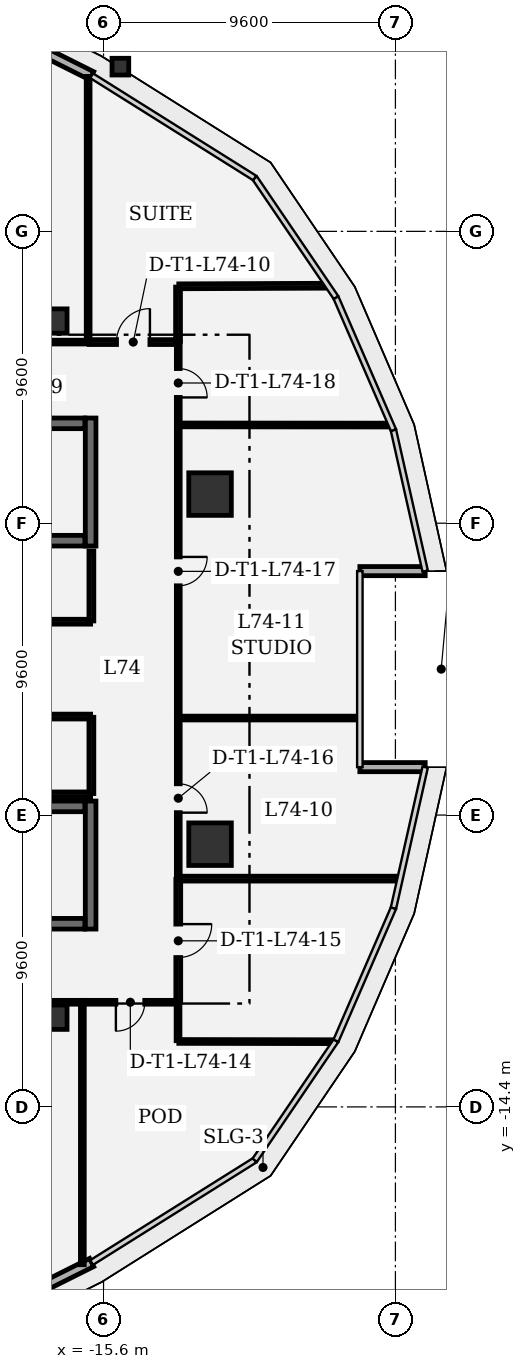
"""IFC4 building model, lengths in metres.
Left out: names, types, materials, properties, quantities, classifications, styles, units other than length and angle.
Written with IfcOpenShell. Run it as: python <this file> out.ifc"""

import sys

from ifc_helpers import new_model, si_unit, direction, frame, frame_2d, origin, origin_2d, place, context, subcontext, project, spatial, rectangle, extrude, element, fill, save


model = new_model("IFC4")
c1 = context("Model", 3, precision=1e-05, world=origin(), true_north=direction((0.0, 1.0)))
c2 = subcontext(c1, "Body", "Model", "MODEL_VIEW")
j1 = project(units=[si_unit("LENGTHUNIT", "METRE"), si_unit("PLANEANGLEUNIT", "RADIAN")], contexts=[c1])
p1 = place(None, origin())
s1 = spatial("IfcSite", under=j1, at=p1, CompositionType="ELEMENT")
p2 = place(p1, origin())
s2 = spatial("IfcBuilding", under=s1, at=p2, CompositionType="ELEMENT")
p3 = place(p2, frame((0.0, 0.0, 318.6)))
s3 = spatial("IfcBuildingStorey", under=s2, at=p3, CompositionType="ELEMENT", Elevation=318.6)
for number, where, z_axis, x_axis in (
    (1, (-12.097, -5.758, 0.0), (0.0, 0.0, 1.0), (1.0, 0.0, 0.0)),
    (2, (-12.097, 5.758, 0.0), (0.0, 0.0, 1.0), (1.0, 0.0, 0.0)),
):
    element("IfcColumn", number, at=place(p3, frame(where, z_axis=z_axis, x_axis=x_axis)), inside=s3, PredefinedType="COLUMN", context=c2, shape_type="SweptSolid", body=[
        extrude(rectangle(XDim=1.4, YDim=1.4, at=origin_2d()), origin(), (0.0, 0.0, 1.0), 4.2),
    ])
for number, where, z_axis, x_axis in (
    (3, (-17.2, 11.45, 0.0), (0.0, 0.0, 1.0), (1.0, 0.0, 0.0)),
    (4, (-17.2, -11.45, 0.0), (0.0, 0.0, 1.0), (1.0, 0.0, 0.0)),
):
    element("IfcColumn", number, at=place(p3, frame(where, z_axis=z_axis, x_axis=x_axis)), inside=s3, PredefinedType="COLUMN", context=c2, shape_type="SweptSolid", body=[
        extrude(rectangle(XDim=0.8, YDim=0.8, at=origin_2d()), origin(), (0.0, 0.0, 1.0), 4.2),
    ])
p4 = place(p3, frame((-15.046, 19.818, 0.0), z_axis=(0.0, 0.0, 1.0), x_axis=(1.0, 0.0, 0.0)))
e5 = element("IfcColumn", 5, at=p4, inside=s3, PredefinedType="COLUMN", context=c2, shape_type="SweptSolid", body=[
    extrude(rectangle(XDim=0.55, YDim=0.55, at=origin_2d()), origin(), (0.0, 0.0, 1.0), 4.2),
])
p5 = place(p3, frame((-15.991, -19.518, 0.0), z_axis=(0.0, 0.0, 1.0), x_axis=(-0.894441735477, -0.447184505362, 0.0)))
e6 = element("IfcWall", 6, at=p5, inside=s3, PredefinedType="SOLIDWALL", context=c2, shape_type="SweptSolid", body=[
    extrude(rectangle(XDim=3.357, YDim=0.3, at=frame_2d((1.678, 0.0))), origin(), (0.0, 0.0, 1.0), 3.91),
])
for number, where, z_axis, x_axis in (
    (7, (-5.021, -3.224, 0.0), (0.0, 0.0, 1.0), (-1.0, 0.0, 0.0)),
    (8, (-7.17, 3.224, 0.0), (0.0, 0.0, 1.0), (1.0, 0.0, 0.0)),
):
    element("IfcWall", number, at=place(p3, frame(where, z_axis=z_axis, x_axis=x_axis)), inside=s3, PredefinedType="SOLIDWALL", context=c2, shape_type="SweptSolid", body=[
        extrude(rectangle(XDim=2.149, YDim=0.3, at=frame_2d((1.075, 0.0))), origin(), (0.0, 0.0, 1.0), 3.91),
    ])
p6 = place(p3, frame((-18.993, 21.019, 0.0), z_axis=(0.0, 0.0, 1.0), x_axis=(0.894441735477, -0.447184505362, 0.0)))
e9 = element("IfcWall", 9, at=p6, inside=s3, PredefinedType="SOLIDWALL", context=c2, shape_type="SweptSolid", body=[
    extrude(rectangle(XDim=3.357, YDim=0.3, at=frame_2d((1.678, 0.0))), origin(), (0.0, 0.0, 1.0), 3.91),
])
p7 = place(p3, frame((-16.025, 4.05, 0.0), z_axis=(0.0, 0.0, 1.0), x_axis=(0.0, 1.0, 0.0)))
e10 = element("IfcWall", 10, at=p7, inside=s3, PredefinedType="SHEAR", context=c2, shape_type="SweptSolid", body=[
    extrude(rectangle(XDim=4.21, YDim=0.35, at=frame_2d((2.105, 0.0))), origin(), (0.0, 0.0, 1.0), 3.91),
])
p8 = place(p3, frame((-24.335, 4.225, 0.0), z_axis=(0.0, 0.0, 1.0), x_axis=(1.0, 0.0, 0.0)))
e11 = element("IfcWall", 11, at=p8, inside=s3, PredefinedType="SHEAR", context=c2, shape_type="SweptSolid", body=[
    extrude(rectangle(XDim=8.12, YDim=0.35, at=frame_2d((4.06, 0.0))), origin(), (0.0, 0.0, 1.0), 3.91),
])
p9 = place(p3, frame((-16.215, 8.085, 0.0), z_axis=(0.0, 0.0, 1.0), x_axis=(-1.0, 0.0, 0.0)))
e12 = element("IfcWall", 12, at=p9, inside=s3, PredefinedType="SHEAR", context=c2, shape_type="SweptSolid", body=[
    extrude(rectangle(XDim=8.12, YDim=0.35, at=frame_2d((4.06, 0.0))), origin(), (0.0, 0.0, 1.0), 3.91),
])
p10 = place(p9, frame((6.74, 0.0, 0.0)))
e13 = element("IfcOpeningElement", 13, at=p10, cuts=e12, PredefinedType="OPENING", context=c2, shape_type="SweptSolid", body=[
    extrude(rectangle(XDim=1.1, YDim=2.2, at=frame_2d((0.55, 1.1))), frame((0.0, 0.185, 0.0), z_axis=(0.0, -1.0, 0.0), x_axis=(1.0, 0.0, 0.0)), (0.0, 0.0, 1.0), 0.37),
])
p11 = place(p3, frame((-16.025, -8.55, 0.0), z_axis=(0.0, 0.0, 1.0), x_axis=(0.0, 1.0, 0.0)))
e14 = element("IfcWall", 14, at=p11, inside=s3, PredefinedType="SHEAR", context=c2, shape_type="SweptSolid", body=[
    extrude(rectangle(XDim=4.21, YDim=0.35, at=frame_2d((2.105, 0.0))), origin(), (0.0, 0.0, 1.0), 3.91),
])
p12 = place(p3, frame((-24.335, -8.375, 0.0), z_axis=(0.0, 0.0, 1.0), x_axis=(1.0, 0.0, 0.0)))
e15 = element("IfcWall", 15, at=p12, inside=s3, PredefinedType="SHEAR", context=c2, shape_type="SweptSolid", body=[
    extrude(rectangle(XDim=8.12, YDim=0.35, at=frame_2d((4.06, 0.0))), origin(), (0.0, 0.0, 1.0), 3.91),
])
p13 = place(p12, frame((0.28, 0.0, 0.0)))
e16 = element("IfcOpeningElement", 16, at=p13, cuts=e15, PredefinedType="OPENING", context=c2, shape_type="SweptSolid", body=[
    extrude(rectangle(XDim=1.1, YDim=2.2, at=frame_2d((0.55, 1.1))), frame((0.0, 0.185, 0.0), z_axis=(0.0, -1.0, 0.0), x_axis=(1.0, 0.0, 0.0)), (0.0, 0.0, 1.0), 0.37),
])
p14 = place(p3, frame((-16.215, -4.515, 0.0), z_axis=(0.0, 0.0, 1.0), x_axis=(-1.0, 0.0, 0.0)))
e17 = element("IfcWall", 17, at=p14, inside=s3, PredefinedType="SHEAR", context=c2, shape_type="SweptSolid", body=[
    extrude(rectangle(XDim=8.12, YDim=0.35, at=frame_2d((4.06, 0.0))), origin(), (0.0, 0.0, 1.0), 3.91),
])
p15 = place(p3, frame((-22.934, 1.56, 0.0), z_axis=(0.0, 0.0, 1.0), x_axis=(1.0, 0.0, 0.0)))
e18 = element("IfcWall", 18, at=p15, inside=s3, PredefinedType="PARTITIONING", context=c2, shape_type="SweptSolid", body=[
    extrude(rectangle(XDim=6.909, YDim=0.16, at=frame_2d((3.455, 0.0))), origin(), (0.0, 0.0, 1.0), 3.91),
])
p16 = place(p15, frame((2.905, 0.0, 0.0)))
e19 = element("IfcOpeningElement", 19, at=p16, cuts=e18, PredefinedType="OPENING", context=c2, shape_type="SweptSolid", body=[
    extrude(rectangle(XDim=1.1, YDim=2.15, at=frame_2d((0.55, 1.075))), frame((0.0, 0.09, 0.0), z_axis=(0.0, -1.0, 0.0), x_axis=(1.0, 0.0, 0.0)), (0.0, 0.0, 1.0), 0.18),
])
p17 = place(p3, frame((-16.0, 1.585, 0.0), z_axis=(0.0, 0.0, 1.0), x_axis=(0.0, 1.0, 0.0)))
e20 = element("IfcWall", 20, at=p17, inside=s3, PredefinedType="PARTITIONING", context=c2, shape_type="SweptSolid", body=[
    extrude(rectangle(XDim=2.302, YDim=0.16, at=frame_2d((1.151, 0.0))), origin(), (0.0, 0.0, 1.0), 3.91),
])
p18 = place(p3, frame((-28.575, -4.12, 0.0), z_axis=(0.0, 0.0, 1.0), x_axis=(1.0, 0.0, 0.0)))
e21 = element("IfcWall", 21, at=p18, inside=s3, PredefinedType="PARTITIONING", context=c2, shape_type="SweptSolid", body=[
    extrude(rectangle(XDim=12.55, YDim=0.16, at=frame_2d((6.275, 0.0))), origin(), (0.0, 0.0, 1.0), 3.91),
])
p19 = place(p3, frame((-16.0, -4.095, 0.0), z_axis=(0.0, 0.0, 1.0), x_axis=(0.0, 1.0, 0.0)))
e22 = element("IfcWall", 22, at=p19, inside=s3, PredefinedType="PARTITIONING", context=c2, shape_type="SweptSolid", body=[
    extrude(rectangle(XDim=2.51, YDim=0.16, at=frame_2d((1.255, 0.0))), origin(), (0.0, 0.0, 1.0), 3.91),
])
p20 = place(p3, frame((-16.025, -1.56, 0.0), z_axis=(0.0, 0.0, 1.0), x_axis=(-1.0, 0.0, 0.0)))
e23 = element("IfcWall", 23, at=p20, inside=s3, PredefinedType="PARTITIONING", context=c2, shape_type="SweptSolid", body=[
    extrude(rectangle(XDim=8.709, YDim=0.16, at=frame_2d((4.354, 0.0))), origin(), (0.0, 0.0, 1.0), 3.91),
])
p21 = place(p20, frame((3.804, 0.0, 0.0)))
e24 = element("IfcOpeningElement", 24, at=p21, cuts=e23, PredefinedType="OPENING", context=c2, shape_type="SweptSolid", body=[
    extrude(rectangle(XDim=1.1, YDim=2.15, at=frame_2d((0.55, 1.075))), frame((0.0, 0.09, 0.0), z_axis=(0.0, -1.0, 0.0), x_axis=(1.0, 0.0, 0.0)), (0.0, 0.0, 1.0), 0.18),
])
p22 = place(p3, frame((-21.78, 10.758, 0.0), z_axis=(0.0, 0.0, 1.0), x_axis=(1.0, 0.0, 0.0)))
e25 = element("IfcWall", 25, at=p22, inside=s3, PredefinedType="PARTITIONING", context=c2, shape_type="SweptSolid", body=[
    extrude(rectangle(XDim=5.649, YDim=0.125, at=frame_2d((2.824, 0.0))), origin(), (0.0, 0.0, 1.0), 3.529),
])
p23 = place(p22, frame((2.349, 0.0, 0.0)))
e26 = element("IfcOpeningElement", 26, at=p23, cuts=e25, PredefinedType="OPENING", context=c2, shape_type="SweptSolid", body=[
    extrude(rectangle(XDim=0.95, YDim=2.15, at=frame_2d((0.475, 1.075))), frame((0.0, 0.073, 0.0), z_axis=(0.0, -1.0, 0.0), x_axis=(1.0, 0.0, 0.0)), (0.0, 0.0, 1.0), 0.145),
])
p24 = place(p3, frame((-16.106, 10.783, 0.0), z_axis=(0.0, 0.0, 1.0), x_axis=(-0.000112079351, 0.999999993719, 0.0)))
e27 = element("IfcWall", 27, at=p24, inside=s3, PredefinedType="PARTITIONING", context=c2, shape_type="SweptSolid", body=[
    extrude(rectangle(XDim=8.713, YDim=0.125, at=frame_2d((4.356, 0.0))), origin(), (0.0, 0.0, 1.0), 3.13),
])
p25 = place(p3, frame((-16.073, 10.758, 0.0), z_axis=(0.0, 0.0, 1.0), x_axis=(1.0, 0.0, 0.0)))
e28 = element("IfcWall", 28, at=p25, inside=s3, PredefinedType="PARTITIONING", context=c2, shape_type="SweptSolid", body=[
    extrude(rectangle(XDim=2.899, YDim=0.16, at=frame_2d((1.449, 0.0))), origin(), (0.0, 0.0, 1.0), 3.91),
])
p26 = place(p25, frame((0.899, 0.0, 0.0)))
e29 = element("IfcOpeningElement", 29, at=p26, cuts=e28, PredefinedType="OPENING", context=c2, shape_type="SweptSolid", body=[
    extrude(rectangle(XDim=1.1, YDim=2.15, at=frame_2d((0.55, 1.075))), frame((0.0, 0.09, 0.0), z_axis=(0.0, -1.0, 0.0), x_axis=(1.0, 0.0, 0.0)), (0.0, 0.0, 1.0), 0.18),
])
p27 = place(p3, frame((-13.15, 10.783, 0.0), z_axis=(0.0, 0.0, 1.0), x_axis=(0.0, 1.0, 0.0)))
e30 = element("IfcWall", 30, at=p27, inside=s3, PredefinedType="PARTITIONING", context=c2, shape_type="SweptSolid", body=[
    extrude(rectangle(XDim=1.784, YDim=0.16, at=frame_2d((0.892, 0.0))), origin(), (0.0, 0.0, 1.0), 3.91),
])
p28 = place(p3, frame((-13.125, 12.593, 0.0), z_axis=(0.0, 0.0, 1.0), x_axis=(0.999992212385, 0.003946538786, 0.0)))
e31 = element("IfcWall", 31, at=p28, inside=s3, PredefinedType="PARTITIONING", context=c2, shape_type="SweptSolid", body=[
    extrude(rectangle(XDim=4.825, YDim=0.16, at=frame_2d((2.413, 0.0))), origin(), (0.0, 0.0, 1.0), 3.91),
])
p29 = place(p3, frame((-16.322, -10.958, 0.0), z_axis=(0.0, 0.0, 1.0), x_axis=(-1.0, 0.0, 0.0)))
e32 = element("IfcWall", 32, at=p29, inside=s3, PredefinedType="PARTITIONING", context=c2, shape_type="SweptSolid", body=[
    extrude(rectangle(XDim=6.522, YDim=0.125, at=frame_2d((3.261, 0.0))), origin(), (0.0, 0.0, 1.0), 3.529),
])
p30 = place(p29, frame((2.786, 0.0, 0.0)))
e33 = element("IfcOpeningElement", 33, at=p30, cuts=e32, PredefinedType="OPENING", context=c2, shape_type="SweptSolid", body=[
    extrude(rectangle(XDim=0.95, YDim=2.15, at=frame_2d((0.475, 1.075))), frame((0.0, 0.073, 0.0), z_axis=(0.0, -1.0, 0.0), x_axis=(1.0, 0.0, 0.0)), (0.0, 0.0, 1.0), 0.145),
])
p31 = place(p3, frame((-16.297, -19.591, 0.0), z_axis=(0.0, 0.0, 1.0), x_axis=(8.5082246e-05, 0.999999996381, 0.0)))
e34 = element("IfcWall", 34, at=p31, inside=s3, PredefinedType="PARTITIONING", context=c2, shape_type="SweptSolid", body=[
    extrude(rectangle(XDim=8.608, YDim=0.125, at=frame_2d((4.304, 0.0))), origin(), (0.0, 0.0, 1.0), 3.13),
])
p32 = place(p3, frame((-8.057, -12.255, 0.0), z_axis=(0.0, 0.0, 1.0), x_axis=(-0.999998811776, 0.001541572501, 0.0)))
e35 = element("IfcWall", 35, at=p32, inside=s3, PredefinedType="PARTITIONING", context=c2, shape_type="SweptSolid", body=[
    extrude(rectangle(XDim=5.068, YDim=0.125, at=frame_2d((2.534, 0.0))), origin(), (0.0, 0.0, 1.0), 3.91),
])
p33 = place(p3, frame((-13.15, -12.222, 0.0), z_axis=(0.0, 0.0, 1.0), x_axis=(0.0, 1.0, 0.0)))
e36 = element("IfcWall", 36, at=p33, inside=s3, PredefinedType="PARTITIONING", context=c2, shape_type="SweptSolid", body=[
    extrude(rectangle(XDim=1.239, YDim=0.125, at=frame_2d((0.62, 0.0))), origin(), (0.0, 0.0, 1.0), 3.91),
])
p34 = place(p3, frame((-13.175, -10.958, 0.0), z_axis=(0.0, 0.0, 1.0), x_axis=(-1.0, 0.0, 0.0)))
e37 = element("IfcWall", 37, at=p34, inside=s3, PredefinedType="PARTITIONING", context=c2, shape_type="SweptSolid", body=[
    extrude(rectangle(XDim=3.089, YDim=0.125, at=frame_2d((1.544, 0.0))), origin(), (0.0, 0.0, 1.0), 3.91),
])
p35 = place(p34, frame((1.069, 0.0, 0.0)))
e38 = element("IfcOpeningElement", 38, at=p35, cuts=e37, PredefinedType="OPENING", context=c2, shape_type="SweptSolid", body=[
    extrude(rectangle(XDim=0.95, YDim=2.15, at=frame_2d((0.475, 1.075))), frame((0.0, 0.073, 0.0), z_axis=(0.0, -1.0, 0.0), x_axis=(1.0, 0.0, 0.0)), (0.0, 0.0, 1.0), 0.145),
])
p36 = place(p3, frame((-5.926, -6.891, 0.0), z_axis=(0.0, 0.0, 1.0), x_axis=(-1.0, 0.0, 0.0)))
e39 = element("IfcWall", 39, at=p36, inside=s3, PredefinedType="PARTITIONING", context=c2, shape_type="SweptSolid", body=[
    extrude(rectangle(XDim=7.191, YDim=0.16, at=frame_2d((3.596, 0.0))), origin(), (0.0, 0.0, 1.0), 3.91),
])
p37 = place(p3, frame((-13.142, -6.916, 0.0), z_axis=(0.0, 0.0, 1.0), x_axis=(0.0, -1.0, 0.0)))
e40 = element("IfcWall", 40, at=p37, inside=s3, PredefinedType="PARTITIONING", context=c2, shape_type="SweptSolid", body=[
    extrude(rectangle(XDim=4.042, YDim=0.16, at=frame_2d((2.021, 0.0))), origin(), (0.0, 0.0, 1.0), 3.13),
])
p38 = place(p37, frame((1.471, 0.0, 0.0)))
e41 = element("IfcOpeningElement", 41, at=p38, cuts=e40, PredefinedType="OPENING", context=c2, shape_type="SweptSolid", body=[
    extrude(rectangle(XDim=1.1, YDim=2.15, at=frame_2d((0.55, 1.075))), frame((0.0, 0.09, 0.0), z_axis=(0.0, -1.0, 0.0), x_axis=(1.0, 0.0, 0.0)), (0.0, 0.0, 1.0), 0.18),
])
p39 = place(p3, frame((-7.25, -1.609, 0.0), z_axis=(0.0, 0.0, 1.0), x_axis=(-1.0, 0.0, 0.0)))
e42 = element("IfcWall", 42, at=p39, inside=s3, PredefinedType="PARTITIONING", context=c2, shape_type="SweptSolid", body=[
    extrude(rectangle(XDim=5.868, YDim=0.125, at=frame_2d((2.934, 0.0))), origin(), (0.0, 0.0, 1.0), 3.91),
])
p40 = place(p3, frame((-13.142, -1.634, 0.0), z_axis=(0.0, 0.0, 1.0), x_axis=(0.0, -1.0, 0.0)))
e43 = element("IfcWall", 43, at=p40, inside=s3, PredefinedType="PARTITIONING", context=c2, shape_type="SweptSolid", body=[
    extrude(rectangle(XDim=5.224, YDim=0.125, at=frame_2d((2.612, 0.0))), origin(), (0.0, 0.0, 1.0), 3.13),
])
p41 = place(p40, frame((2.137, 0.0, 0.0)))
e44 = element("IfcOpeningElement", 44, at=p41, cuts=e43, PredefinedType="OPENING", context=c2, shape_type="SweptSolid", body=[
    extrude(rectangle(XDim=0.95, YDim=2.15, at=frame_2d((0.475, 1.075))), frame((0.0, 0.073, 0.0), z_axis=(0.0, -1.0, 0.0), x_axis=(1.0, 0.0, 0.0)), (0.0, 0.0, 1.0), 0.145),
])
p42 = place(p3, frame((-6.216, 8.028, 0.0), z_axis=(0.0, 0.0, 1.0), x_axis=(-0.999999749677, 0.000707563681, 0.0)))
e45 = element("IfcWall", 45, at=p42, inside=s3, PredefinedType="PARTITIONING", context=c2, shape_type="SweptSolid", body=[
    extrude(rectangle(XDim=6.901, YDim=0.125, at=frame_2d((3.45, 0.0))), origin(), (0.0, 0.0, 1.0), 3.91),
])
p43 = place(p3, frame((-13.142, 8.008, 0.0), z_axis=(0.0, 0.0, 1.0), x_axis=(0.0, -1.0, 0.0)))
e46 = element("IfcWall", 46, at=p43, inside=s3, PredefinedType="PARTITIONING", context=c2, shape_type="SweptSolid", body=[
    extrude(rectangle(XDim=9.584, YDim=0.125, at=frame_2d((4.792, 0.0))), origin(), (0.0, 0.0, 1.0), 3.13),
])
p44 = place(p43, frame((4.317, 0.0, 0.0)))
e47 = element("IfcOpeningElement", 47, at=p44, cuts=e46, PredefinedType="OPENING", context=c2, shape_type="SweptSolid", body=[
    extrude(rectangle(XDim=0.95, YDim=2.15, at=frame_2d((0.475, 1.075))), frame((0.0, 0.073, 0.0), z_axis=(0.0, -1.0, 0.0), x_axis=(1.0, 0.0, 0.0)), (0.0, 0.0, 1.0), 0.145),
])
p45 = place(p3, frame((-13.142, 10.758, 0.0), z_axis=(0.0, 0.0, 1.0), x_axis=(0.0, -1.0, 0.0)))
e48 = element("IfcWall", 48, at=p45, inside=s3, PredefinedType="PARTITIONING", context=c2, shape_type="SweptSolid", body=[
    extrude(rectangle(XDim=2.692, YDim=0.125, at=frame_2d((1.346, 0.0))), origin(), (0.0, 0.0, 1.0), 3.13),
])
p46 = place(p45, frame((0.871, 0.0, 0.0)))
e49 = element("IfcOpeningElement", 49, at=p46, cuts=e48, PredefinedType="OPENING", context=c2, shape_type="SweptSolid", body=[
    extrude(rectangle(XDim=0.95, YDim=2.15, at=frame_2d((0.475, 1.075))), frame((0.0, 0.073, 0.0), z_axis=(0.0, -1.0, 0.0), x_axis=(1.0, 0.0, 0.0)), (0.0, 0.0, 1.0), 0.145),
])
p47 = place(p26, origin())
e50 = element("IfcDoor", 50, at=p47, inside=s3, OperationType="SINGLE_SWING_RIGHT", PredefinedType="DOOR", context=c2, shape_type="SweptSolid", body=[
    extrude(rectangle(XDim=1.1, YDim=2.15, at=frame_2d((0.55, 1.075))), frame((0.0, 0.025, 0.0), z_axis=(0.0, -1.0, 0.0), x_axis=(1.0, 0.0, 0.0)), (0.0, 0.0, 1.0), 0.05),
])
fill(e29, e50)
p48 = place(p35, origin())
e51 = element("IfcDoor", 51, at=p48, inside=s3, OperationType="SINGLE_SWING_RIGHT", PredefinedType="DOOR", context=c2, shape_type="SweptSolid", body=[
    extrude(rectangle(XDim=0.95, YDim=2.15, at=frame_2d((0.475, 1.075))), frame((0.0, 0.025, 0.0), z_axis=(0.0, -1.0, 0.0), x_axis=(1.0, 0.0, 0.0)), (0.0, 0.0, 1.0), 0.05),
])
fill(e38, e51)
p49 = place(p38, origin())
e52 = element("IfcDoor", 52, at=p49, inside=s3, OperationType="SINGLE_SWING_LEFT", PredefinedType="DOOR", context=c2, shape_type="SweptSolid", body=[
    extrude(rectangle(XDim=1.1, YDim=2.15, at=frame_2d((0.55, 1.075))), frame((0.0, 0.025, 0.0), z_axis=(0.0, -1.0, 0.0), x_axis=(1.0, 0.0, 0.0)), (0.0, 0.0, 1.0), 0.05),
])
fill(e41, e52)
p50 = place(p41, origin())
e53 = element("IfcDoor", 53, at=p50, inside=s3, OperationType="SINGLE_SWING_RIGHT", PredefinedType="DOOR", context=c2, shape_type="SweptSolid", body=[
    extrude(rectangle(XDim=0.95, YDim=2.15, at=frame_2d((0.475, 1.075))), frame((0.0, 0.025, 0.0), z_axis=(0.0, -1.0, 0.0), x_axis=(1.0, 0.0, 0.0)), (0.0, 0.0, 1.0), 0.05),
])
fill(e44, e53)
p51 = place(p44, origin())
e54 = element("IfcDoor", 54, at=p51, inside=s3, OperationType="SINGLE_SWING_LEFT", PredefinedType="DOOR", context=c2, shape_type="SweptSolid", body=[
    extrude(rectangle(XDim=0.95, YDim=2.15, at=frame_2d((0.475, 1.075))), frame((0.0, 0.025, 0.0), z_axis=(0.0, -1.0, 0.0), x_axis=(1.0, 0.0, 0.0)), (0.0, 0.0, 1.0), 0.05),
])
fill(e47, e54)
p52 = place(p46, origin())
e55 = element("IfcDoor", 55, at=p52, inside=s3, OperationType="SINGLE_SWING_RIGHT", PredefinedType="DOOR", context=c2, shape_type="SweptSolid", body=[
    extrude(rectangle(XDim=0.95, YDim=2.15, at=frame_2d((0.475, 1.075))), frame((0.0, 0.025, 0.0), z_axis=(0.0, -1.0, 0.0), x_axis=(1.0, 0.0, 0.0)), (0.0, 0.0, 1.0), 0.05),
])
fill(e49, e55)
save(model, sys.argv[1])
